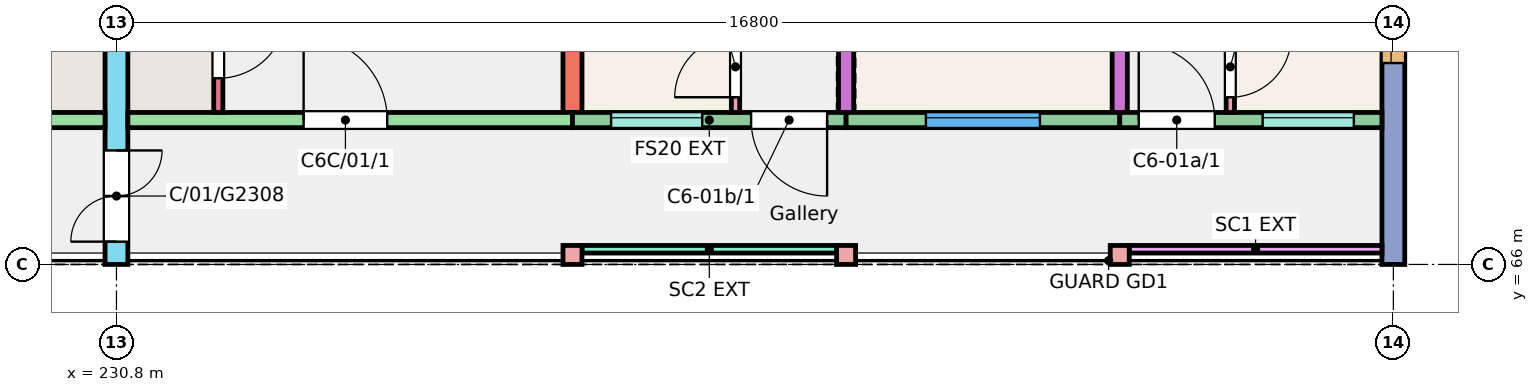
"""IFC4 building model, lengths in metres.
Left out: names, types, materials, properties, quantities, classifications, styles, units other than length and angle.
Written with IfcOpenShell. Run it as: python <this file> out.ifc"""

import sys

from ifc_helpers import new_model, si_unit, direction, frame, frame_2d, origin, origin_2d, place, context, subcontext, project, spatial, rectangle, extrude, element, fill, save


model = new_model("IFC4")
c1 = context("Model", 3, precision=1e-05, world=origin(), true_north=direction((0.0, 1.0)))
c2 = subcontext(c1, "Body", "Model", "MODEL_VIEW")
j1 = project(units=[si_unit("LENGTHUNIT", "METRE"), si_unit("PLANEANGLEUNIT", "RADIAN")], contexts=[c1])
p1 = place(None, origin())
s1 = spatial("IfcSite", under=j1, at=p1, CompositionType="ELEMENT")
p2 = place(p1, origin())
s2 = spatial("IfcBuilding", under=s1, at=p2, CompositionType="ELEMENT")
p3 = place(p2, frame((0.0, 0.0, 3.0)))
s3 = spatial("IfcBuildingStorey", under=s2, at=p3, CompositionType="ELEMENT", Elevation=3.0)
p4 = place(p3, frame((230.8, 66.0, 0.0), z_axis=(0.0, 0.0, 1.0), x_axis=(0.0, 1.0, 0.0)))
e1 = element("IfcWall", 1, at=p4, inside=s3, PredefinedType="SHEAR", context=c2, shape_type="SweptSolid", body=[
    extrude(rectangle(XDim=11.0, YDim=0.3, at=frame_2d((5.5, 0.0))), origin(), (0.0, 0.0, 1.0), 3.0),
])
p5 = place(p4, frame((0.3, 0.0, 0.0)))
e2 = element("IfcOpeningElement", 2, at=p5, cuts=e1, PredefinedType="OPENING", context=c2, shape_type="SweptSolid", body=[
    extrude(rectangle(XDim=1.2, YDim=2.1, at=frame_2d((0.6, 1.05))), frame((0.0, 0.16, 0.0), z_axis=(0.0, -1.0, 0.0), x_axis=(1.0, 0.0, 0.0)), (0.0, 0.0, 1.0), 0.32),
])
p6 = place(p3, frame((236.8, 68.0, 0.0), z_axis=(0.0, 0.0, 1.0), x_axis=(0.0, 1.0, 0.0)))
e3 = element("IfcWall", 3, at=p6, inside=s3, PredefinedType="SHEAR", context=c2, shape_type="SweptSolid", body=[
    extrude(rectangle(XDim=9.0, YDim=0.25, at=frame_2d((4.5, 0.0))), origin(), (0.0, 0.0, 1.0), 3.0),
])
p7 = place(p3, frame((240.4, 68.0, 0.0), z_axis=(0.0, 0.0, 1.0), x_axis=(0.0, 1.0, 0.0)))
e4 = element("IfcWall", 4, at=p7, inside=s3, PredefinedType="SHEAR", context=c2, shape_type="SweptSolid", body=[
    extrude(rectangle(XDim=9.0, YDim=0.2, at=frame_2d((4.5, 0.0))), origin(), (0.0, 0.0, 1.0), 3.0),
])
p8 = place(p7, frame((2.4, 0.0, 0.0)))
e5 = element("IfcOpeningElement", 5, at=p8, cuts=e4, PredefinedType="OPENING", context=c2, shape_type="SweptSolid", body=[
    extrude(rectangle(XDim=1.2, YDim=2.1, at=frame_2d((0.6, 1.05))), frame((0.0, 0.11, 0.0), z_axis=(0.0, -1.0, 0.0), x_axis=(1.0, 0.0, 0.0)), (0.0, 0.0, 1.0), 0.22),
])
p9 = place(p7, frame((6.4, 0.0, 0.0)))
e6 = element("IfcOpeningElement", 6, at=p9, cuts=e4, PredefinedType="OPENING", context=c2, shape_type="SweptSolid", body=[
    extrude(rectangle(XDim=1.2, YDim=2.1, at=frame_2d((0.6, 1.05))), frame((0.0, 0.11, 0.0), z_axis=(0.0, -1.0, 0.0), x_axis=(1.0, 0.0, 0.0)), (0.0, 0.0, 1.0), 0.22),
])
p10 = place(p3, frame((244.0, 68.0, 0.0), z_axis=(0.0, 0.0, 1.0), x_axis=(0.0, 1.0, 0.0)))
e7 = element("IfcWall", 7, at=p10, inside=s3, PredefinedType="SHEAR", context=c2, shape_type="SweptSolid", body=[
    extrude(rectangle(XDim=9.0, YDim=0.2, at=frame_2d((4.5, 0.0))), origin(), (0.0, 0.0, 1.0), 3.0),
])
p11 = place(p3, frame((247.6, 66.0, 0.0), z_axis=(0.0, 0.0, 1.0), x_axis=(0.0, 1.0, 0.0)))
e8 = element("IfcWall", 8, at=p11, inside=s3, PredefinedType="SHEAR", context=c2, shape_type="SweptSolid", body=[
    extrude(rectangle(XDim=11.0, YDim=0.3, at=frame_2d((5.5, 0.0))), origin(), (0.0, 0.0, 1.0), 3.0),
])
p12 = place(p11, frame((2.65, 0.0, 0.9)))
e9 = element("IfcOpeningElement", 9, at=p12, cuts=e8, PredefinedType="OPENING", context=c2, shape_type="SweptSolid", body=[
    extrude(rectangle(XDim=1.2, YDim=1.5, at=frame_2d((0.6, 0.75))), frame((0.0, 0.16, 0.0), z_axis=(0.0, -1.0, 0.0), x_axis=(1.0, 0.0, 0.0)), (0.0, 0.0, 1.0), 0.32),
])
p13 = place(p11, frame((7.805, 0.0, 0.9)))
e10 = element("IfcOpeningElement", 10, at=p13, cuts=e8, PredefinedType="OPENING", context=c2, shape_type="SweptSolid", body=[
    extrude(rectangle(XDim=1.8, YDim=1.5, at=frame_2d((0.9, 0.75))), frame((0.0, 0.16, 0.0), z_axis=(0.0, -1.0, 0.0), x_axis=(1.0, 0.0, 0.0)), (0.0, 0.0, 1.0), 0.32),
])
p14 = place(p3, frame((224.8, 67.9, 0.0), z_axis=(0.0, 0.0, 1.0), x_axis=(1.0, 0.0, 0.0)))
e11 = element("IfcWall", 11, at=p14, inside=s3, PredefinedType="SHEAR", context=c2, shape_type="SweptSolid", body=[
    extrude(rectangle(XDim=5.85, YDim=0.2, at=frame_2d((2.925, 0.0))), origin(), (0.0, 0.0, 1.0), 3.0),
])
p15 = place(p14, frame((2.438, 0.0, 0.0)))
e12 = element("IfcOpeningElement", 12, at=p15, cuts=e11, PredefinedType="OPENING", context=c2, shape_type="SweptSolid", body=[
    extrude(rectangle(XDim=1.1, YDim=2.1, at=frame_2d((0.55, 1.05))), frame((0.0, 0.11, 0.0), z_axis=(0.0, -1.0, 0.0), x_axis=(1.0, 0.0, 0.0)), (0.0, 0.0, 1.0), 0.22),
])
p16 = place(p3, frame((230.95, 67.9, 0.0), z_axis=(0.0, 0.0, 1.0), x_axis=(1.0, 0.0, 0.0)))
e13 = element("IfcWall", 13, at=p16, inside=s3, PredefinedType="SHEAR", context=c2, shape_type="SweptSolid", body=[
    extrude(rectangle(XDim=5.85, YDim=0.2, at=frame_2d((2.925, 0.0))), origin(), (0.0, 0.0, 1.0), 3.0),
])
p17 = place(p16, frame((2.312, 0.0, 0.0)))
e14 = element("IfcOpeningElement", 14, at=p17, cuts=e13, PredefinedType="OPENING", context=c2, shape_type="SweptSolid", body=[
    extrude(rectangle(XDim=1.1, YDim=2.1, at=frame_2d((0.55, 1.05))), frame((0.0, 0.11, 0.0), z_axis=(0.0, -1.0, 0.0), x_axis=(1.0, 0.0, 0.0)), (0.0, 0.0, 1.0), 0.22),
])
p18 = place(p3, frame((232.14, 68.0, 0.0), z_axis=(0.0, 0.0, 1.0), x_axis=(0.0, 1.0, 0.0)))
e15 = element("IfcWall", 15, at=p18, inside=s3, PredefinedType="SHEAR", context=c2, shape_type="SweptSolid", body=[
    extrude(rectangle(XDim=1.72, YDim=0.12, at=frame_2d((0.86, 0.0))), origin(), (0.0, 0.0, 1.0), 3.0),
])
p19 = place(p18, frame((0.45, 0.0, 0.0)))
e16 = element("IfcOpeningElement", 16, at=p19, cuts=e15, PredefinedType="OPENING", context=c2, shape_type="SweptSolid", body=[
    extrude(rectangle(XDim=0.9, YDim=2.1, at=frame_2d((0.45, 1.05))), frame((0.0, 0.07, 0.0), z_axis=(0.0, -1.0, 0.0), x_axis=(1.0, 0.0, 0.0)), (0.0, 0.0, 1.0), 0.14),
])
p20 = place(p3, frame((236.8, 67.9, 0.0), z_axis=(0.0, 0.0, 1.0), x_axis=(1.0, 0.0, 0.0)))
e17 = element("IfcWall", 17, at=p20, inside=s3, PredefinedType="SOLIDWALL", context=c2, shape_type="SweptSolid", body=[
    extrude(rectangle(XDim=3.6, YDim=0.2, at=frame_2d((1.8, 0.0))), origin(), (0.0, 0.0, 1.0), 3.0),
])
p21 = place(p20, frame((0.508, 0.0, 1.1)))
e18 = element("IfcOpeningElement", 18, at=p21, cuts=e17, PredefinedType="OPENING", context=c2, shape_type="SweptSolid", body=[
    extrude(rectangle(XDim=1.2, YDim=1.3, at=frame_2d((0.6, 0.65))), frame((0.0, 0.11, 0.0), z_axis=(0.0, -1.0, 0.0), x_axis=(1.0, 0.0, 0.0)), (0.0, 0.0, 1.0), 0.22),
])
p22 = place(p20, frame((2.35, 0.0, 0.0)))
e19 = element("IfcOpeningElement", 19, at=p22, cuts=e17, PredefinedType="OPENING", context=c2, shape_type="SweptSolid", body=[
    extrude(rectangle(XDim=1.0, YDim=2.1, at=frame_2d((0.5, 1.05))), frame((0.0, 0.11, 0.0), z_axis=(0.0, -1.0, 0.0), x_axis=(1.0, 0.0, 0.0)), (0.0, 0.0, 1.0), 0.22),
])
p23 = place(p3, frame((240.4, 67.9, 0.0), z_axis=(0.0, 0.0, 1.0), x_axis=(1.0, 0.0, 0.0)))
e20 = element("IfcWall", 20, at=p23, inside=s3, PredefinedType="SOLIDWALL", context=c2, shape_type="SweptSolid", body=[
    extrude(rectangle(XDim=3.6, YDim=0.2, at=frame_2d((1.8, 0.0))), origin(), (0.0, 0.0, 1.0), 3.0),
])
p24 = place(p23, frame((1.05, 0.0, 0.9)))
e21 = element("IfcOpeningElement", 21, at=p24, cuts=e20, PredefinedType="OPENING", context=c2, shape_type="SweptSolid", body=[
    extrude(rectangle(XDim=1.5, YDim=1.5, at=frame_2d((0.75, 0.75))), frame((0.0, 0.11, 0.0), z_axis=(0.0, -1.0, 0.0), x_axis=(1.0, 0.0, 0.0)), (0.0, 0.0, 1.0), 0.22),
])
p25 = place(p3, frame((244.0, 67.9, 0.0), z_axis=(0.0, 0.0, 1.0), x_axis=(1.0, 0.0, 0.0)))
e22 = element("IfcWall", 22, at=p25, inside=s3, PredefinedType="SOLIDWALL", context=c2, shape_type="SweptSolid", body=[
    extrude(rectangle(XDim=3.45, YDim=0.2, at=frame_2d((1.725, 0.0))), origin(), (0.0, 0.0, 1.0), 3.0),
])
p26 = place(p25, frame((1.88, 0.0, 1.1)))
e23 = element("IfcOpeningElement", 23, at=p26, cuts=e22, PredefinedType="OPENING", context=c2, shape_type="SweptSolid", body=[
    extrude(rectangle(XDim=1.2, YDim=1.3, at=frame_2d((0.6, 0.65))), frame((0.0, 0.11, 0.0), z_axis=(0.0, -1.0, 0.0), x_axis=(1.0, 0.0, 0.0)), (0.0, 0.0, 1.0), 0.22),
])
p27 = place(p25, frame((0.25, 0.0, 0.0)))
e24 = element("IfcOpeningElement", 24, at=p27, cuts=e22, PredefinedType="OPENING", context=c2, shape_type="SweptSolid", body=[
    extrude(rectangle(XDim=1.0, YDim=2.1, at=frame_2d((0.5, 1.05))), frame((0.0, 0.11, 0.0), z_axis=(0.0, -1.0, 0.0), x_axis=(1.0, 0.0, 0.0)), (0.0, 0.0, 1.0), 0.22),
])
for number, where, z_axis, x_axis in (
    (25, (236.8, 66.125, 0.0), (0.0, 0.0, 1.0), (1.0, 0.0, 0.0)),
    (26, (240.4, 66.125, 0.0), (0.0, 0.0, 1.0), (1.0, 0.0, 0.0)),
    (27, (244.0, 66.125, 0.0), (0.0, 0.0, 1.0), (1.0, 0.0, 0.0)),
):
    element("IfcColumn", number, at=place(p3, frame(where, z_axis=z_axis, x_axis=x_axis)), inside=s3, PredefinedType="COLUMN", context=c2, shape_type="SweptSolid", body=[
        extrude(rectangle(XDim=0.25, YDim=0.25, at=origin_2d()), origin(), (0.0, 0.0, 1.0), 3.0),
    ])
p28 = place(p3, frame((236.925, 66.2, 0.0), z_axis=(0.0, 0.0, 1.0), x_axis=(1.0, 0.0, 0.0)))
e28 = element("IfcWall", 28, at=p28, inside=s3, PredefinedType="SOLIDWALL", context=c2, shape_type="SweptSolid", body=[
    extrude(rectangle(XDim=3.35, YDim=0.1, at=frame_2d((1.675, 0.0))), origin(), (0.0, 0.0, 1.0), 2.45),
])
p29 = place(p3, frame((244.125, 66.2, 0.0), z_axis=(0.0, 0.0, 1.0), x_axis=(1.0, 0.0, 0.0)))
e29 = element("IfcWall", 29, at=p29, inside=s3, PredefinedType="SOLIDWALL", context=c2, shape_type="SweptSolid", body=[
    extrude(rectangle(XDim=3.325, YDim=0.1, at=frame_2d((1.663, 0.0))), origin(), (0.0, 0.0, 1.0), 2.45),
])
p30 = place(p3, frame((245.455, 68.0, 0.0), z_axis=(0.0, 0.0, 1.0), x_axis=(0.0, 1.0, 0.0)))
e30 = element("IfcWall", 30, at=p30, inside=s3, PredefinedType="PARTITIONING", context=c2, shape_type="SweptSolid", body=[
    extrude(rectangle(XDim=4.3, YDim=0.11, at=frame_2d((2.15, 0.0))), origin(), (0.0, 0.0, 1.0), 2.8),
])
p31 = place(p30, frame((0.2, 0.0, 0.0)))
e31 = element("IfcOpeningElement", 31, at=p31, cuts=e30, PredefinedType="OPENING", context=c2, shape_type="SweptSolid", body=[
    extrude(rectangle(XDim=0.8, YDim=2.1, at=frame_2d((0.4, 1.05))), frame((0.0, 0.065, 0.0), z_axis=(0.0, -1.0, 0.0), x_axis=(1.0, 0.0, 0.0)), (0.0, 0.0, 1.0), 0.13),
])
p32 = place(p30, frame((3.35, 0.0, 0.0)))
e32 = element("IfcOpeningElement", 32, at=p32, cuts=e30, PredefinedType="OPENING", context=c2, shape_type="SweptSolid", body=[
    extrude(rectangle(XDim=0.8, YDim=2.1, at=frame_2d((0.4, 1.05))), frame((0.0, 0.065, 0.0), z_axis=(0.0, -1.0, 0.0), x_axis=(1.0, 0.0, 0.0)), (0.0, 0.0, 1.0), 0.13),
])
p33 = place(p3, frame((238.945, 68.0, 0.0), z_axis=(0.0, 0.0, 1.0), x_axis=(0.0, 1.0, 0.0)))
e33 = element("IfcWall", 33, at=p33, inside=s3, PredefinedType="PARTITIONING", context=c2, shape_type="SweptSolid", body=[
    extrude(rectangle(XDim=4.3, YDim=0.11, at=frame_2d((2.15, 0.0))), origin(), (0.0, 0.0, 1.0), 2.8),
])
p34 = place(p33, frame((0.2, 0.0, 0.0)))
e34 = element("IfcOpeningElement", 34, at=p34, cuts=e33, PredefinedType="OPENING", context=c2, shape_type="SweptSolid", body=[
    extrude(rectangle(XDim=0.8, YDim=2.1, at=frame_2d((0.4, 1.05))), frame((0.0, 0.065, 0.0), z_axis=(0.0, -1.0, 0.0), x_axis=(1.0, 0.0, 0.0)), (0.0, 0.0, 1.0), 0.13),
])
p35 = place(p33, frame((3.35, 0.0, 0.0)))
e35 = element("IfcOpeningElement", 35, at=p35, cuts=e33, PredefinedType="OPENING", context=c2, shape_type="SweptSolid", body=[
    extrude(rectangle(XDim=0.8, YDim=2.1, at=frame_2d((0.4, 1.05))), frame((0.0, 0.065, 0.0), z_axis=(0.0, -1.0, 0.0), x_axis=(1.0, 0.0, 0.0)), (0.0, 0.0, 1.0), 0.13),
])
p36 = place(p26, origin())
e36 = element("IfcWindow", 36, at=p36, inside=s3, PartitioningType="SINGLE_PANEL", PredefinedType="WINDOW", context=c2, shape_type="SweptSolid", body=[
    extrude(rectangle(XDim=1.2, YDim=1.3, at=frame_2d((0.6, 0.65))), frame((0.0, 0.06, 0.0), z_axis=(0.0, -1.0, 0.0), x_axis=(1.0, 0.0, 0.0)), (0.0, 0.0, 1.0), 0.06),
])
fill(e23, e36)
p37 = place(p12, origin())
e37 = element("IfcWindow", 37, at=p37, inside=s3, PartitioningType="SINGLE_PANEL", PredefinedType="WINDOW", context=c2, shape_type="SweptSolid", body=[
    extrude(rectangle(XDim=1.2, YDim=1.5, at=frame_2d((0.6, 0.75))), frame((0.0, 0.06, 0.0), z_axis=(0.0, -1.0, 0.0), x_axis=(1.0, 0.0, 0.0)), (0.0, 0.0, 1.0), 0.06),
])
fill(e9, e37)
p38 = place(p24, origin())
e38 = element("IfcWindow", 38, at=p38, inside=s3, PartitioningType="SINGLE_PANEL", PredefinedType="WINDOW", context=c2, shape_type="SweptSolid", body=[
    extrude(rectangle(XDim=1.5, YDim=1.5, at=frame_2d((0.75, 0.75))), frame((0.0, 0.06, 0.0), z_axis=(0.0, -1.0, 0.0), x_axis=(1.0, 0.0, 0.0)), (0.0, 0.0, 1.0), 0.06),
])
fill(e21, e38)
p39 = place(p21, origin())
e39 = element("IfcWindow", 39, at=p39, inside=s3, PartitioningType="SINGLE_PANEL", PredefinedType="WINDOW", context=c2, shape_type="SweptSolid", body=[
    extrude(rectangle(XDim=1.2, YDim=1.3, at=frame_2d((0.6, 0.65))), frame((0.0, 0.06, 0.0), z_axis=(0.0, -1.0, 0.0), x_axis=(1.0, 0.0, 0.0)), (0.0, 0.0, 1.0), 0.06),
])
fill(e18, e39)
p40 = place(p27, origin())
e40 = element("IfcDoor", 40, at=p40, inside=s3, OperationType="SINGLE_SWING_LEFT", PredefinedType="DOOR", context=c2, shape_type="SweptSolid", body=[
    extrude(rectangle(XDim=1.0, YDim=2.1, at=frame_2d((0.5, 1.05))), frame((0.0, 0.025, 0.0), z_axis=(0.0, -1.0, 0.0), x_axis=(1.0, 0.0, 0.0)), (0.0, 0.0, 1.0), 0.05),
])
fill(e24, e40)
p41 = place(p31, origin())
e41 = element("IfcDoor", 41, at=p41, inside=s3, OperationType="SINGLE_SWING_RIGHT", PredefinedType="DOOR", context=c2, shape_type="SweptSolid", body=[
    extrude(rectangle(XDim=0.8, YDim=2.1, at=frame_2d((0.4, 1.05))), frame((0.0, 0.025, 0.0), z_axis=(0.0, -1.0, 0.0), x_axis=(1.0, 0.0, 0.0)), (0.0, 0.0, 1.0), 0.05),
])
fill(e31, e41)
p42 = place(p22, origin())
e42 = element("IfcDoor", 42, at=p42, inside=s3, OperationType="SINGLE_SWING_RIGHT", PredefinedType="DOOR", context=c2, shape_type="SweptSolid", body=[
    extrude(rectangle(XDim=1.0, YDim=2.1, at=frame_2d((0.5, 1.05))), frame((0.0, 0.025, 0.0), z_axis=(0.0, -1.0, 0.0), x_axis=(1.0, 0.0, 0.0)), (0.0, 0.0, 1.0), 0.05),
])
fill(e19, e42)
p43 = place(p34, origin())
e43 = element("IfcDoor", 43, at=p43, inside=s3, OperationType="SINGLE_SWING_LEFT", PredefinedType="DOOR", context=c2, shape_type="SweptSolid", body=[
    extrude(rectangle(XDim=0.8, YDim=2.1, at=frame_2d((0.4, 1.05))), frame((0.0, 0.025, 0.0), z_axis=(0.0, -1.0, 0.0), x_axis=(1.0, 0.0, 0.0)), (0.0, 0.0, 1.0), 0.05),
])
fill(e34, e43)
p44 = place(p17, origin())
e44 = element("IfcDoor", 44, at=p44, inside=s3, OperationType="SINGLE_SWING_LEFT", PredefinedType="DOOR", context=c2, shape_type="SweptSolid", body=[
    extrude(rectangle(XDim=1.1, YDim=2.1, at=frame_2d((0.55, 1.05))), frame((0.0, 0.025, 0.0), z_axis=(0.0, -1.0, 0.0), x_axis=(1.0, 0.0, 0.0)), (0.0, 0.0, 1.0), 0.05),
])
fill(e14, e44)
p45 = place(p19, origin())
e45 = element("IfcDoor", 45, at=p45, inside=s3, OperationType="SINGLE_SWING_RIGHT", PredefinedType="DOOR", context=c2, shape_type="SweptSolid", body=[
    extrude(rectangle(XDim=0.9, YDim=2.1, at=frame_2d((0.45, 1.05))), frame((0.0, 0.025, 0.0), z_axis=(0.0, -1.0, 0.0), x_axis=(1.0, 0.0, 0.0)), (0.0, 0.0, 1.0), 0.05),
])
fill(e16, e45)
p46 = place(p5, origin())
e46 = element("IfcDoor", 46, at=p46, inside=s3, OperationType="DOUBLE_DOOR_SINGLE_SWING", PredefinedType="DOOR", context=c2, shape_type="SweptSolid", body=[
    extrude(rectangle(XDim=1.2, YDim=2.1, at=frame_2d((0.6, 1.05))), frame((0.0, 0.025, 0.0), z_axis=(0.0, -1.0, 0.0), x_axis=(1.0, 0.0, 0.0)), (0.0, 0.0, 1.0), 0.05),
])
fill(e2, e46)
save(model, sys.argv[1])
